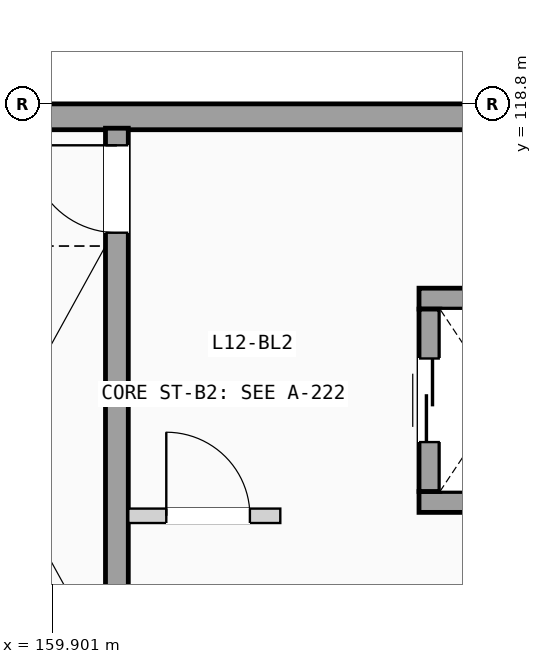
"""IFC4 building model, lengths in metres.
Left out: names, types, materials, properties, quantities, classifications, styles, units other than length and angle.
Written with IfcOpenShell. Run it as: python <this file> out.ifc"""

import sys

from ifc_helpers import new_model, si_unit, direction, frame, frame_2d, origin, place, context, subcontext, project, spatial, rectangle, extrude, element, fill, save


model = new_model("IFC4")
c1 = context("Model", 3, precision=1e-05, world=origin(), true_north=direction((0.0, 1.0)))
c2 = subcontext(c1, "Body", "Model", "MODEL_VIEW")
j1 = project(units=[si_unit("LENGTHUNIT", "METRE"), si_unit("PLANEANGLEUNIT", "RADIAN")], contexts=[c1])
p1 = place(None, origin())
s1 = spatial("IfcSite", under=j1, at=p1, CompositionType="ELEMENT")
p2 = place(p1, origin())
s2 = spatial("IfcBuilding", under=s1, at=p2, CompositionType="ELEMENT")
p3 = place(p2, frame((0.0, 0.0, 40.425)))
s3 = spatial("IfcBuildingStorey", under=s2, at=p3, CompositionType="ELEMENT", Elevation=40.425)
p4 = place(p3, frame((156.0, 118.63, 0.0), z_axis=(0.0, 0.0, 1.0), x_axis=(1.0, 0.0, 0.0)))
e1 = element("IfcWall", 1, at=p4, inside=s3, PredefinedType="SOLIDWALL", context=c2, shape_type="SweptSolid", body=[
    extrude(rectangle(XDim=12.0, YDim=0.34, at=frame_2d((6.0, 0.0))), origin(), (0.0, 0.0, 1.0), 2.55),
])
p5 = place(p3, frame((160.75, 111.48, 0.0), z_axis=(0.0, 0.0, 1.0), x_axis=(0.0, 1.0, 0.0)))
e2 = element("IfcWall", 2, at=p5, inside=s3, PredefinedType="SHEAR", context=c2, shape_type="SweptSolid", body=[
    extrude(rectangle(XDim=7.0, YDim=0.3, at=frame_2d((3.5, 0.0))), origin(), (0.0, 0.0, 1.0), 2.55),
])
p6 = place(p5, frame((5.625, 0.0, 0.0)))
e3 = element("IfcOpeningElement", 3, at=p6, cuts=e2, PredefinedType="OPENING", context=c2, shape_type="SweptSolid", body=[
    extrude(rectangle(XDim=1.15, YDim=2.12, at=frame_2d((0.575, 1.06))), frame((0.0, 0.16, 0.0), z_axis=(0.0, -1.0, 0.0), x_axis=(1.0, 0.0, 0.0)), (0.0, 0.0, 1.0), 0.32),
])
for number, where, z_axis, x_axis in (
    (4, (164.725, 113.562, 0.0), (0.0, 0.0, 1.0), (1.0, 0.0, 0.0)),
    (5, (164.725, 116.238, 0.0), (0.0, 0.0, 1.0), (1.0, 0.0, 0.0)),
):
    element("IfcWall", number, at=place(p3, frame(where, z_axis=z_axis, x_axis=x_axis)), inside=s3, PredefinedType="SHEAR", context=c2, shape_type="SweptSolid", body=[
        extrude(rectangle(XDim=2.15, YDim=0.275, at=frame_2d((1.075, 0.0))), origin(), (0.0, 0.0, 1.0), 2.55),
    ])
p7 = place(p3, frame((164.863, 113.7, 0.0), z_axis=(0.0, 0.0, 1.0), x_axis=(0.0, 1.0, 0.0)))
e6 = element("IfcWall", 6, at=p7, inside=s3, PredefinedType="SHEAR", context=c2, shape_type="SweptSolid", body=[
    extrude(rectangle(XDim=2.4, YDim=0.275, at=frame_2d((1.2, 0.0))), origin(), (0.0, 0.0, 1.0), 2.55),
])
p8 = place(p7, frame((0.65, 0.0, 0.0)))
e7 = element("IfcOpeningElement", 7, at=p8, cuts=e6, PredefinedType="OPENING", context=c2, shape_type="SweptSolid", body=[
    extrude(rectangle(XDim=1.1, YDim=2.15, at=frame_2d((0.55, 1.075))), frame((0.0, 0.147, 0.0), z_axis=(0.0, -1.0, 0.0), x_axis=(1.0, 0.0, 0.0)), (0.0, 0.0, 1.0), 0.295),
])
p9 = place(p3, frame((160.9, 113.38, 0.0), z_axis=(0.0, 0.0, 1.0), x_axis=(1.0, 0.0, 0.0)))
e8 = element("IfcWall", 8, at=p9, inside=s3, PredefinedType="PARTITIONING", context=c2, shape_type="SweptSolid", body=[
    extrude(rectangle(XDim=2.0, YDim=0.19, at=frame_2d((1.0, 0.0))), origin(), (0.0, 0.0, 1.0), 2.39),
])
p10 = place(p9, frame((0.5, 0.0, 0.0)))
e9 = element("IfcOpeningElement", 9, at=p10, cuts=e8, PredefinedType="OPENING", context=c2, shape_type="SweptSolid", body=[
    extrude(rectangle(XDim=1.1, YDim=2.12, at=frame_2d((0.55, 1.06))), frame((0.0, 0.105, 0.0), z_axis=(0.0, -1.0, 0.0), x_axis=(1.0, 0.0, 0.0)), (0.0, 0.0, 1.0), 0.21),
])
p11 = place(p6, origin())
e10 = element("IfcDoor", 10, at=p11, inside=s3, OperationType="SINGLE_SWING_RIGHT", PredefinedType="DOOR", context=c2, shape_type="SweptSolid", body=[
    extrude(rectangle(XDim=1.15, YDim=2.12, at=frame_2d((0.575, 1.06))), frame((0.0, 0.025, 0.0), z_axis=(0.0, -1.0, 0.0), x_axis=(1.0, 0.0, 0.0)), (0.0, 0.0, 1.0), 0.05),
])
fill(e3, e10)
p12 = place(p8, origin())
e11 = element("IfcDoor", 11, at=p12, inside=s3, OperationType="SLIDING_TO_LEFT", PredefinedType="DOOR", context=c2, shape_type="SweptSolid", body=[
    extrude(rectangle(XDim=1.1, YDim=2.15, at=frame_2d((0.55, 1.075))), frame((0.0, 0.025, 0.0), z_axis=(0.0, -1.0, 0.0), x_axis=(1.0, 0.0, 0.0)), (0.0, 0.0, 1.0), 0.05),
])
fill(e7, e11)
p13 = place(p10, origin())
e12 = element("IfcDoor", 12, at=p13, inside=s3, OperationType="SINGLE_SWING_LEFT", PredefinedType="DOOR", context=c2, shape_type="SweptSolid", body=[
    extrude(rectangle(XDim=1.1, YDim=2.12, at=frame_2d((0.55, 1.06))), frame((0.0, 0.025, 0.0), z_axis=(0.0, -1.0, 0.0), x_axis=(1.0, 0.0, 0.0)), (0.0, 0.0, 1.0), 0.05),
])
fill(e9, e12)
save(model, sys.argv[1])
